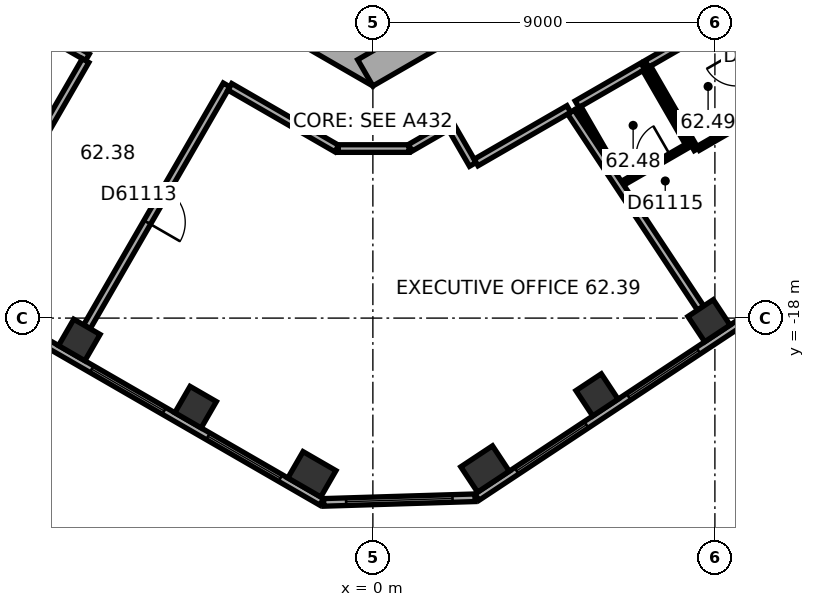
"""IFC4 building model, lengths in metres.
Left out: names, types, materials, properties, quantities, classifications, styles, units other than length and angle.
Written with IfcOpenShell. Run it as: python <this file> out.ifc"""

import sys

from ifc_helpers import new_model, si_unit, direction, frame, frame_2d, origin, origin_2d, place, context, subcontext, project, spatial, rectangle, extrude, element, fill, save


model = new_model("IFC4")
c1 = context("Model", 3, precision=1e-05, world=origin(), true_north=direction((0.0, 1.0)))
c2 = subcontext(c1, "Body", "Model", "MODEL_VIEW")
j1 = project(units=[si_unit("LENGTHUNIT", "METRE"), si_unit("PLANEANGLEUNIT", "RADIAN")], contexts=[c1])
p1 = place(None, origin())
s1 = spatial("IfcSite", under=j1, at=p1, CompositionType="ELEMENT")
p2 = place(p1, origin())
s2 = spatial("IfcBuilding", under=s1, at=p2, CompositionType="ELEMENT")
p3 = place(p2, frame((0.0, 0.0, 251.3)))
s3 = spatial("IfcBuildingStorey", under=s2, at=p3, CompositionType="ELEMENT", Elevation=251.3)
for number, where, z_axis, x_axis in (
    (1, (-7.725, -18.576, 0.0), (0.0, 0.0, 1.0), (0.866, -0.5, 0.0)),
    (2, (-4.665, -20.343, 0.0), (0.0, 0.0, 1.0), (0.866, -0.5, 0.0)),
):
    element("IfcColumn", number, at=place(p3, frame(where, z_axis=z_axis, x_axis=x_axis)), inside=s3, PredefinedType="COLUMN", context=c2, shape_type="SweptSolid", body=[
        extrude(rectangle(XDim=0.8, YDim=0.8, at=origin_2d()), origin(), (0.0, 0.0, 1.0), 3.7),
    ])
for number, where, z_axis, x_axis in (
    (3, (-1.604, -22.11, 0.0), (0.0, 0.0, 1.0), (0.866, -0.5, 0.0)),
    (4, (2.951, -21.971, 0.0), (0.0, 0.0, 1.0), (0.834, 0.552, 0.0)),
):
    element("IfcColumn", number, at=place(p3, frame(where, z_axis=z_axis, x_axis=x_axis)), inside=s3, PredefinedType="COLUMN", context=c2, shape_type="SweptSolid", body=[
        extrude(rectangle(XDim=1.0, YDim=0.8, at=origin_2d()), origin(), (0.0, 0.0, 1.0), 3.7),
    ])
for number, where, z_axis, x_axis in (
    (5, (5.898, -20.021, 0.0), (0.0, 0.0, 1.0), (0.834, 0.552, 0.0)),
    (6, (8.844, -18.07, 0.0), (0.0, 0.0, 1.0), (0.834, 0.552, 0.0)),
):
    element("IfcColumn", number, at=place(p3, frame(where, z_axis=z_axis, x_axis=x_axis)), inside=s3, PredefinedType="COLUMN", context=c2, shape_type="SweptSolid", body=[
        extrude(rectangle(XDim=0.8, YDim=0.8, at=origin_2d()), origin(), (0.0, 0.0, 1.0), 3.7),
    ])
p4 = place(p3, frame((-10.1, -5.6, 0.0), z_axis=(0.0, 0.0, 1.0), x_axis=(0.866023897231, -0.500002609418, 0.0)))
e7 = element("IfcWall", 7, at=p4, inside=s3, PredefinedType="SHEAR", context=c2, shape_type="SweptSolid", body=[
    extrude(rectangle(XDim=11.894, YDim=0.8, at=frame_2d((5.947, 0.0))), origin(), (0.0, 0.0, 1.0), 3.7),
])
p5 = place(p4, frame((6.147, 0.0, 0.0)))
e8 = element("IfcOpeningElement", 8, at=p5, cuts=e7, PredefinedType="OPENING", context=c2, shape_type="SweptSolid", body=[
    extrude(rectangle(XDim=1.5, YDim=2.1, at=frame_2d((0.75, 1.05))), frame((0.0, 0.41, 0.0), z_axis=(0.0, -1.0, 0.0), x_axis=(1.0, 0.0, 0.0)), (0.0, 0.0, 1.0), 0.82),
])
p6 = place(p4, frame((1.597, 0.0, 0.0)))
e9 = element("IfcOpeningElement", 9, at=p6, cuts=e7, PredefinedType="OPENING", context=c2, shape_type="SweptSolid", body=[
    extrude(rectangle(XDim=1.1, YDim=2.1, at=frame_2d((0.55, 1.05))), frame((0.0, 0.41, 0.0), z_axis=(0.0, -1.0, 0.0), x_axis=(1.0, 0.0, 0.0)), (0.0, 0.0, 1.0), 0.82),
])
p7 = place(p4, frame((4.197, 0.0, 0.0)))
e10 = element("IfcOpeningElement", 10, at=p7, cuts=e7, PredefinedType="OPENING", context=c2, shape_type="SweptSolid", body=[
    extrude(rectangle(XDim=1.1, YDim=2.1, at=frame_2d((0.55, 1.05))), frame((0.0, 0.41, 0.0), z_axis=(0.0, -1.0, 0.0), x_axis=(1.0, 0.0, 0.0)), (0.0, 0.0, 1.0), 0.82),
])
p8 = place(p3, frame((-0.2, -11.547, 0.0), z_axis=(0.0, 0.0, 1.0), x_axis=(0.866023897231, 0.500002609418, 0.0)))
e11 = element("IfcWall", 11, at=p8, inside=s3, PredefinedType="SHEAR", context=c2, shape_type="SweptSolid", body=[
    extrude(rectangle(XDim=11.894, YDim=0.8, at=frame_2d((5.947, 0.0))), origin(), (0.0, 0.0, 1.0), 3.7),
])
p9 = place(p8, frame((2.497, 0.0, 0.0)))
e12 = element("IfcOpeningElement", 12, at=p9, cuts=e11, PredefinedType="OPENING", context=c2, shape_type="SweptSolid", body=[
    extrude(rectangle(XDim=1.1, YDim=2.1, at=frame_2d((0.55, 1.05))), frame((0.0, 0.41, 0.0), z_axis=(0.0, -1.0, 0.0), x_axis=(1.0, 0.0, 0.0)), (0.0, 0.0, 1.0), 0.82),
])
p10 = place(p8, frame((5.097, 0.0, 0.0)))
e13 = element("IfcOpeningElement", 13, at=p10, cuts=e11, PredefinedType="OPENING", context=c2, shape_type="SweptSolid", body=[
    extrude(rectangle(XDim=1.1, YDim=2.1, at=frame_2d((0.55, 1.05))), frame((0.0, 0.41, 0.0), z_axis=(0.0, -1.0, 0.0), x_axis=(1.0, 0.0, 0.0)), (0.0, 0.0, 1.0), 0.82),
])
p11 = place(p8, frame((7.697, 0.0, 0.0)))
e14 = element("IfcOpeningElement", 14, at=p11, cuts=e11, PredefinedType="OPENING", context=c2, shape_type="SweptSolid", body=[
    extrude(rectangle(XDim=1.1, YDim=2.1, at=frame_2d((0.55, 1.05))), frame((0.0, 0.41, 0.0), z_axis=(0.0, -1.0, 0.0), x_axis=(1.0, 0.0, 0.0)), (0.0, 0.0, 1.0), 0.82),
])
p12 = place(p3, frame((-17.664, -13.415, 0.0), z_axis=(0.0, 0.0, 1.0), x_axis=(0.866026555358, -0.49999800541, 0.0)))
e15 = element("IfcWall", 15, at=p12, inside=s3, PredefinedType="STANDARD", context=c2, shape_type="SweptSolid", body=[
    extrude(rectangle(XDim=18.841, YDim=0.2, at=frame_2d((9.421, 0.0))), origin(), (0.0, 0.0, 1.0), 3.7),
])
p13 = place(p12, frame((1.254, 0.0, 0.9)))
e16 = element("IfcOpeningElement", 16, at=p13, cuts=e15, PredefinedType="OPENING", context=c2, shape_type="SweptSolid", body=[
    extrude(rectangle(XDim=2.2, YDim=2.0, at=frame_2d((1.1, 1.0))), frame((0.0, 0.11, 0.0), z_axis=(0.0, -1.0, 0.0), x_axis=(1.0, 0.0, 0.0)), (0.0, 0.0, 1.0), 0.22),
])
p14 = place(p12, frame((4.788, 0.0, 0.9)))
e17 = element("IfcOpeningElement", 17, at=p14, cuts=e15, PredefinedType="OPENING", context=c2, shape_type="SweptSolid", body=[
    extrude(rectangle(XDim=2.2, YDim=2.0, at=frame_2d((1.1, 1.0))), frame((0.0, 0.11, 0.0), z_axis=(0.0, -1.0, 0.0), x_axis=(1.0, 0.0, 0.0)), (0.0, 0.0, 1.0), 0.22),
])
p15 = place(p12, frame((8.322, 0.0, 0.9)))
e18 = element("IfcOpeningElement", 18, at=p15, cuts=e15, PredefinedType="OPENING", context=c2, shape_type="SweptSolid", body=[
    extrude(rectangle(XDim=2.2, YDim=2.0, at=frame_2d((1.1, 1.0))), frame((0.0, 0.11, 0.0), z_axis=(0.0, -1.0, 0.0), x_axis=(1.0, 0.0, 0.0)), (0.0, 0.0, 1.0), 0.22),
])
p16 = place(p12, frame((11.855, 0.0, 0.9)))
e19 = element("IfcOpeningElement", 19, at=p16, cuts=e15, PredefinedType="OPENING", context=c2, shape_type="SweptSolid", body=[
    extrude(rectangle(XDim=2.2, YDim=2.0, at=frame_2d((1.1, 1.0))), frame((0.0, 0.11, 0.0), z_axis=(0.0, -1.0, 0.0), x_axis=(1.0, 0.0, 0.0)), (0.0, 0.0, 1.0), 0.22),
])
p17 = place(p12, frame((15.389, 0.0, 0.9)))
e20 = element("IfcOpeningElement", 20, at=p17, cuts=e15, PredefinedType="OPENING", context=c2, shape_type="SweptSolid", body=[
    extrude(rectangle(XDim=2.2, YDim=2.0, at=frame_2d((1.1, 1.0))), frame((0.0, 0.11, 0.0), z_axis=(0.0, -1.0, 0.0), x_axis=(1.0, 0.0, 0.0)), (0.0, 0.0, 1.0), 0.22),
])
p18 = place(p3, frame((-1.294, -22.849, 0.0), z_axis=(0.0, 0.0, 1.0), x_axis=(0.999533952558, 0.030526671678, 0.0)))
e21 = element("IfcWall", 21, at=p18, inside=s3, PredefinedType="STANDARD", context=c2, shape_type="SweptSolid", body=[
    extrude(rectangle(XDim=3.983, YDim=0.2, at=frame_2d((1.991, 0.0))), origin(), (0.0, 0.0, 1.0), 3.7),
])
p19 = place(p18, frame((0.591, 0.0, 0.9)))
e22 = element("IfcOpeningElement", 22, at=p19, cuts=e21, PredefinedType="OPENING", context=c2, shape_type="SweptSolid", body=[
    extrude(rectangle(XDim=2.8, YDim=2.0, at=frame_2d((1.4, 1.0))), frame((0.0, 0.11, 0.0), z_axis=(0.0, -1.0, 0.0), x_axis=(1.0, 0.0, 0.0)), (0.0, 0.0, 1.0), 0.22),
])
p20 = place(p3, frame((2.739, -22.711, 0.0), z_axis=(0.0, 0.0, 1.0), x_axis=(0.833885723098, 0.551937134838, 0.0)))
e23 = element("IfcWall", 23, at=p20, inside=s3, PredefinedType="STANDARD", context=c2, shape_type="SweptSolid", body=[
    extrude(rectangle(XDim=18.841, YDim=0.2, at=frame_2d((9.421, 0.0))), origin(), (0.0, 0.0, 1.0), 3.7),
])
p21 = place(p20, frame((1.252, 0.0, 0.9)))
e24 = element("IfcOpeningElement", 24, at=p21, cuts=e23, PredefinedType="OPENING", context=c2, shape_type="SweptSolid", body=[
    extrude(rectangle(XDim=2.2, YDim=2.0, at=frame_2d((1.1, 1.0))), frame((0.0, 0.11, 0.0), z_axis=(0.0, -1.0, 0.0), x_axis=(1.0, 0.0, 0.0)), (0.0, 0.0, 1.0), 0.22),
])
p22 = place(p20, frame((4.786, 0.0, 0.9)))
e25 = element("IfcOpeningElement", 25, at=p22, cuts=e23, PredefinedType="OPENING", context=c2, shape_type="SweptSolid", body=[
    extrude(rectangle(XDim=2.2, YDim=2.0, at=frame_2d((1.1, 1.0))), frame((0.0, 0.11, 0.0), z_axis=(0.0, -1.0, 0.0), x_axis=(1.0, 0.0, 0.0)), (0.0, 0.0, 1.0), 0.22),
])
p23 = place(p20, frame((8.32, 0.0, 0.9)))
e26 = element("IfcOpeningElement", 26, at=p23, cuts=e23, PredefinedType="OPENING", context=c2, shape_type="SweptSolid", body=[
    extrude(rectangle(XDim=2.2, YDim=2.0, at=frame_2d((1.1, 1.0))), frame((0.0, 0.11, 0.0), z_axis=(0.0, -1.0, 0.0), x_axis=(1.0, 0.0, 0.0)), (0.0, 0.0, 1.0), 0.22),
])
p24 = place(p20, frame((11.854, 0.0, 0.9)))
e27 = element("IfcOpeningElement", 27, at=p24, cuts=e23, PredefinedType="OPENING", context=c2, shape_type="SweptSolid", body=[
    extrude(rectangle(XDim=2.2, YDim=2.0, at=frame_2d((1.1, 1.0))), frame((0.0, 0.11, 0.0), z_axis=(0.0, -1.0, 0.0), x_axis=(1.0, 0.0, 0.0)), (0.0, 0.0, 1.0), 0.22),
])
p25 = place(p20, frame((15.387, 0.0, 0.9)))
e28 = element("IfcOpeningElement", 28, at=p25, cuts=e23, PredefinedType="OPENING", context=c2, shape_type="SweptSolid", body=[
    extrude(rectangle(XDim=2.2, YDim=2.0, at=frame_2d((1.1, 1.0))), frame((0.0, 0.11, 0.0), z_axis=(0.0, -1.0, 0.0), x_axis=(1.0, 0.0, 0.0)), (0.0, 0.0, 1.0), 0.22),
])
p26 = place(p3, frame((-11.551, -8.805, 0.0), z_axis=(0.0, 0.0, 1.0), x_axis=(0.866038310922, -0.499977643516, 0.0)))
e29 = element("IfcWall", 29, at=p26, inside=s3, PredefinedType="PARTITIONING", context=c2, shape_type="SweptSolid", body=[
    extrude(rectangle(XDim=4.665, YDim=0.2, at=frame_2d((2.333, 0.0))), origin(), (0.0, 0.0, 1.0), 3.35),
])
p27 = place(p3, frame((-10.585, -16.463, 0.0), z_axis=(0.0, 0.0, 1.0), x_axis=(0.499993802756, 0.866028981735, 0.0)))
e30 = element("IfcWall", 30, at=p27, inside=s3, PredefinedType="PARTITIONING", context=c2, shape_type="SweptSolid", body=[
    extrude(rectangle(XDim=6.049, YDim=0.2, at=frame_2d((3.024, 0.0))), origin(), (0.0, 0.0, 1.0), 2.65),
])
p28 = place(p27, frame((2.524, 0.0, 0.0)))
e31 = element("IfcOpeningElement", 31, at=p28, cuts=e30, PredefinedType="OPENING", context=c2, shape_type="SweptSolid", body=[
    extrude(rectangle(XDim=1.0, YDim=2.1, at=frame_2d((0.5, 1.05))), frame((0.0, 0.11, 0.0), z_axis=(0.0, -1.0, 0.0), x_axis=(1.0, 0.0, 0.0)), (0.0, 0.0, 1.0), 0.22),
])
p29 = place(p3, frame((-7.525, -18.23, 0.0), z_axis=(0.0, 0.0, 1.0), x_axis=(0.499983153418, 0.866035129944, 0.0)))
e32 = element("IfcWall", 32, at=p29, inside=s3, PredefinedType="PARTITIONING", context=c2, shape_type="SweptSolid", body=[
    extrude(rectangle(XDim=7.35, YDim=0.2, at=frame_2d((3.675, 0.0))), origin(), (0.0, 0.0, 1.0), 3.35),
])
p30 = place(p29, frame((3.175, 0.0, 0.0)))
e33 = element("IfcOpeningElement", 33, at=p30, cuts=e32, PredefinedType="OPENING", context=c2, shape_type="SweptSolid", body=[
    extrude(rectangle(XDim=1.0, YDim=2.1, at=frame_2d((0.5, 1.05))), frame((0.0, 0.11, 0.0), z_axis=(0.0, -1.0, 0.0), x_axis=(1.0, 0.0, 0.0)), (0.0, 0.0, 1.0), 0.22),
])
p31 = place(p3, frame((-3.763, -11.915, 0.0), z_axis=(0.0, 0.0, 1.0), x_axis=(0.866037915695, -0.499978328108, 0.0)))
e34 = element("IfcWall", 34, at=p31, inside=s3, PredefinedType="PARTITIONING", context=c2, shape_type="SweptSolid", body=[
    extrude(rectangle(XDim=3.249, YDim=0.2, at=frame_2d((1.625, 0.0))), origin(), (0.0, 0.0, 1.0), 3.35),
])
p32 = place(p3, frame((-0.91, -13.539, 0.0), z_axis=(0.0, 0.0, 1.0), x_axis=(1.0, 0.0, 0.0)))
e35 = element("IfcWall", 35, at=p32, inside=s3, PredefinedType="PARTITIONING", context=c2, shape_type="SweptSolid", body=[
    extrude(rectangle(XDim=1.86, YDim=0.2, at=frame_2d((0.93, 0.0))), origin(), (0.0, 0.0, 1.0), 3.35),
])
p33 = place(p3, frame((0.985, -13.519, 0.0), z_axis=(0.0, 0.0, 1.0), x_axis=(0.866054082991, 0.499950322867, 0.0)))
e36 = element("IfcWall", 36, at=p33, inside=s3, PredefinedType="PARTITIONING", context=c2, shape_type="SweptSolid", body=[
    extrude(rectangle(XDim=1.206, YDim=0.2, at=frame_2d((0.603, 0.0))), origin(), (0.0, 0.0, 1.0), 3.35),
])
p34 = place(p3, frame((2.079, -13.003, 0.0), z_axis=(0.0, 0.0, 1.0), x_axis=(0.500074377092, -0.865982457891, 0.0)))
e37 = element("IfcWall", 37, at=p34, inside=s3, PredefinedType="PARTITIONING", context=c2, shape_type="SweptSolid", body=[
    extrude(rectangle(XDim=1.101, YDim=0.2, at=frame_2d((0.55, 0.0))), origin(), (0.0, 0.0, 1.0), 3.35),
])
p35 = place(p3, frame((2.716, -13.906, 0.0), z_axis=(0.0, 0.0, 1.0), x_axis=(0.866048512801, 0.499959971872, 0.0)))
e38 = element("IfcWall", 38, at=p35, inside=s3, PredefinedType="PARTITIONING", context=c2, shape_type="SweptSolid", body=[
    extrude(rectangle(XDim=2.818, YDim=0.2, at=frame_2d((1.409, 0.0))), origin(), (0.0, 0.0, 1.0), 3.35),
])
p36 = place(p3, frame((5.373, -12.372, 0.0), z_axis=(0.0, 0.0, 1.0), x_axis=(0.866010750942, 0.50002537861, 0.0)))
e39 = element("IfcWall", 39, at=p36, inside=s3, PredefinedType="PARTITIONING", context=c2, shape_type="SweptSolid", body=[
    extrude(rectangle(XDim=2.0, YDim=0.2, at=frame_2d((1.0, 0.0))), origin(), (0.0, 0.0, 1.0), 3.35),
])
p37 = place(p3, frame((6.107, -13.644, 0.0), z_axis=(0.0, 0.0, 1.0), x_axis=(-0.500072492706, 0.865983546056, 0.0)))
e40 = element("IfcWall", 40, at=p37, inside=s3, PredefinedType="PARTITIONING", context=c2, shape_type="SweptSolid", body=[
    extrude(rectangle(XDim=1.368, YDim=0.12, at=frame_2d((0.684, 0.0))), origin(), (0.0, 0.0, 1.0), 3.35),
])
p38 = place(p3, frame((7.155, -11.459, 0.0), z_axis=(0.0, 0.0, 1.0), x_axis=(0.500077740698, -0.865980515519, 0.0)))
e41 = element("IfcWall", 41, at=p38, inside=s3, PredefinedType="PARTITIONING", context=c2, shape_type="SweptSolid", body=[
    extrude(rectangle(XDim=2.3, YDim=0.12, at=frame_2d((1.15, 0.0))), origin(), (0.0, 0.0, 1.0), 3.35),
])
p39 = place(p3, frame((7.208, -11.312, 0.0), z_axis=(0.0, 0.0, 1.0), x_axis=(0.866050243185, 0.499956974429, 0.0)))
e42 = element("IfcWall", 42, at=p39, inside=s3, PredefinedType="PARTITIONING", context=c2, shape_type="SweptSolid", body=[
    extrude(rectangle(XDim=3.514, YDim=0.2, at=frame_2d((1.757, 0.0))), origin(), (0.0, 0.0, 1.0), 3.35),
])
p40 = place(p3, frame((8.253, -13.481, 0.0), z_axis=(0.0, 0.0, 1.0), x_axis=(-0.866045024864, -0.499966013754, 0.0)))
e43 = element("IfcWall", 43, at=p40, inside=s3, PredefinedType="PARTITIONING", context=c2, shape_type="SweptSolid", body=[
    extrude(rectangle(XDim=1.88, YDim=0.12, at=frame_2d((0.94, 0.0))), origin(), (0.0, 0.0, 1.0), 3.35),
])
p41 = place(p40, frame((0.49, 0.0, 0.0)))
e44 = element("IfcOpeningElement", 44, at=p41, cuts=e43, PredefinedType="OPENING", context=c2, shape_type="SweptSolid", body=[
    extrude(rectangle(XDim=0.9, YDim=2.1, at=frame_2d((0.45, 1.05))), frame((0.0, 0.07, 0.0), z_axis=(0.0, -1.0, 0.0), x_axis=(1.0, 0.0, 0.0)), (0.0, 0.0, 1.0), 0.14),
])
p42 = place(p3, frame((8.509, -13.564, 0.0), z_axis=(0.0, 0.0, 1.0), x_axis=(-0.500004234368, 0.866022959057, 0.0)))
e45 = element("IfcWall", 45, at=p42, inside=s3, PredefinedType="PARTITIONING", context=c2, shape_type="SweptSolid", body=[
    extrude(rectangle(XDim=2.5, YDim=0.12, at=frame_2d((1.25, 0.0))), origin(), (0.0, 0.0, 1.0), 3.35),
])
p43 = place(p3, frame((8.624, -17.737, 0.0), z_axis=(0.0, 0.0, 1.0), x_axis=(-0.551945242328, 0.833880356809, 0.0)))
e46 = element("IfcWall", 46, at=p43, inside=s3, PredefinedType="PARTITIONING", context=c2, shape_type="SweptSolid", body=[
    extrude(rectangle(XDim=6.183, YDim=0.2, at=frame_2d((3.091, 0.0))), origin(), (0.0, 0.0, 1.0), 2.65),
])
p44 = place(p3, frame((9.164, -10.299, 0.0), z_axis=(0.0, 0.0, 1.0), x_axis=(0.500004234368, -0.866022959057, 0.0)))
e47 = element("IfcWall", 47, at=p44, inside=s3, PredefinedType="PARTITIONING", context=c2, shape_type="SweptSolid", body=[
    extrude(rectangle(XDim=2.5, YDim=0.12, at=frame_2d((1.25, 0.0))), origin(), (0.0, 0.0, 1.0), 3.35),
])
p45 = place(p44, frame((0.8, 0.0, 0.0)))
e48 = element("IfcOpeningElement", 48, at=p45, cuts=e47, PredefinedType="OPENING", context=c2, shape_type="SweptSolid", body=[
    extrude(rectangle(XDim=0.9, YDim=2.1, at=frame_2d((0.45, 1.05))), frame((0.0, 0.07, 0.0), z_axis=(0.0, -1.0, 0.0), x_axis=(1.0, 0.0, 0.0)), (0.0, 0.0, 1.0), 0.14),
])
p46 = place(p3, frame((10.362, -12.494, 0.0), z_axis=(0.0, 0.0, 1.0), x_axis=(-0.866009661879, -0.500027264788, 0.0)))
e49 = element("IfcWall", 49, at=p46, inside=s3, PredefinedType="PARTITIONING", context=c2, shape_type="SweptSolid", body=[
    extrude(rectangle(XDim=2.08, YDim=0.12, at=frame_2d((1.04, 0.0))), origin(), (0.0, 0.0, 1.0), 3.35),
])
p47 = place(p16, origin())
e50 = element("IfcWindow", 50, at=p47, inside=s3, PartitioningType="SINGLE_PANEL", PredefinedType="WINDOW", context=c2, shape_type="SweptSolid", body=[
    extrude(rectangle(XDim=2.2, YDim=2.0, at=frame_2d((1.1, 1.0))), frame((0.0, 0.03, 0.0), z_axis=(0.0, -1.0, 0.0), x_axis=(1.0, 0.0, 0.0)), (0.0, 0.0, 1.0), 0.06),
])
fill(e19, e50)
p48 = place(p17, origin())
e51 = element("IfcWindow", 51, at=p48, inside=s3, PartitioningType="SINGLE_PANEL", PredefinedType="WINDOW", context=c2, shape_type="SweptSolid", body=[
    extrude(rectangle(XDim=2.2, YDim=2.0, at=frame_2d((1.1, 1.0))), frame((0.0, 0.03, 0.0), z_axis=(0.0, -1.0, 0.0), x_axis=(1.0, 0.0, 0.0)), (0.0, 0.0, 1.0), 0.06),
])
fill(e20, e51)
p49 = place(p19, origin())
e52 = element("IfcWindow", 52, at=p49, inside=s3, PartitioningType="SINGLE_PANEL", PredefinedType="WINDOW", context=c2, shape_type="SweptSolid", body=[
    extrude(rectangle(XDim=2.8, YDim=2.0, at=frame_2d((1.4, 1.0))), frame((0.0, 0.03, 0.0), z_axis=(0.0, -1.0, 0.0), x_axis=(1.0, 0.0, 0.0)), (0.0, 0.0, 1.0), 0.06),
])
fill(e22, e52)
p50 = place(p21, origin())
e53 = element("IfcWindow", 53, at=p50, inside=s3, PartitioningType="SINGLE_PANEL", PredefinedType="WINDOW", context=c2, shape_type="SweptSolid", body=[
    extrude(rectangle(XDim=2.2, YDim=2.0, at=frame_2d((1.1, 1.0))), frame((0.0, 0.03, 0.0), z_axis=(0.0, -1.0, 0.0), x_axis=(1.0, 0.0, 0.0)), (0.0, 0.0, 1.0), 0.06),
])
fill(e24, e53)
p51 = place(p22, origin())
e54 = element("IfcWindow", 54, at=p51, inside=s3, PartitioningType="SINGLE_PANEL", PredefinedType="WINDOW", context=c2, shape_type="SweptSolid", body=[
    extrude(rectangle(XDim=2.2, YDim=2.0, at=frame_2d((1.1, 1.0))), frame((0.0, 0.03, 0.0), z_axis=(0.0, -1.0, 0.0), x_axis=(1.0, 0.0, 0.0)), (0.0, 0.0, 1.0), 0.06),
])
fill(e25, e54)
p52 = place(p30, origin())
e55 = element("IfcDoor", 55, at=p52, inside=s3, OperationType="SINGLE_SWING_LEFT", PredefinedType="DOOR", context=c2, shape_type="SweptSolid", body=[
    extrude(rectangle(XDim=1.0, YDim=2.1, at=frame_2d((0.5, 1.05))), frame((0.0, 0.025, 0.0), z_axis=(0.0, -1.0, 0.0), x_axis=(1.0, 0.0, 0.0)), (0.0, 0.0, 1.0), 0.05),
])
fill(e33, e55)
p53 = place(p41, origin())
e56 = element("IfcDoor", 56, at=p53, inside=s3, OperationType="SINGLE_SWING_LEFT", PredefinedType="DOOR", context=c2, shape_type="SweptSolid", body=[
    extrude(rectangle(XDim=0.9, YDim=2.1, at=frame_2d((0.45, 1.05))), frame((0.0, 0.025, 0.0), z_axis=(0.0, -1.0, 0.0), x_axis=(1.0, 0.0, 0.0)), (0.0, 0.0, 1.0), 0.05),
])
fill(e44, e56)
save(model, sys.argv[1])
